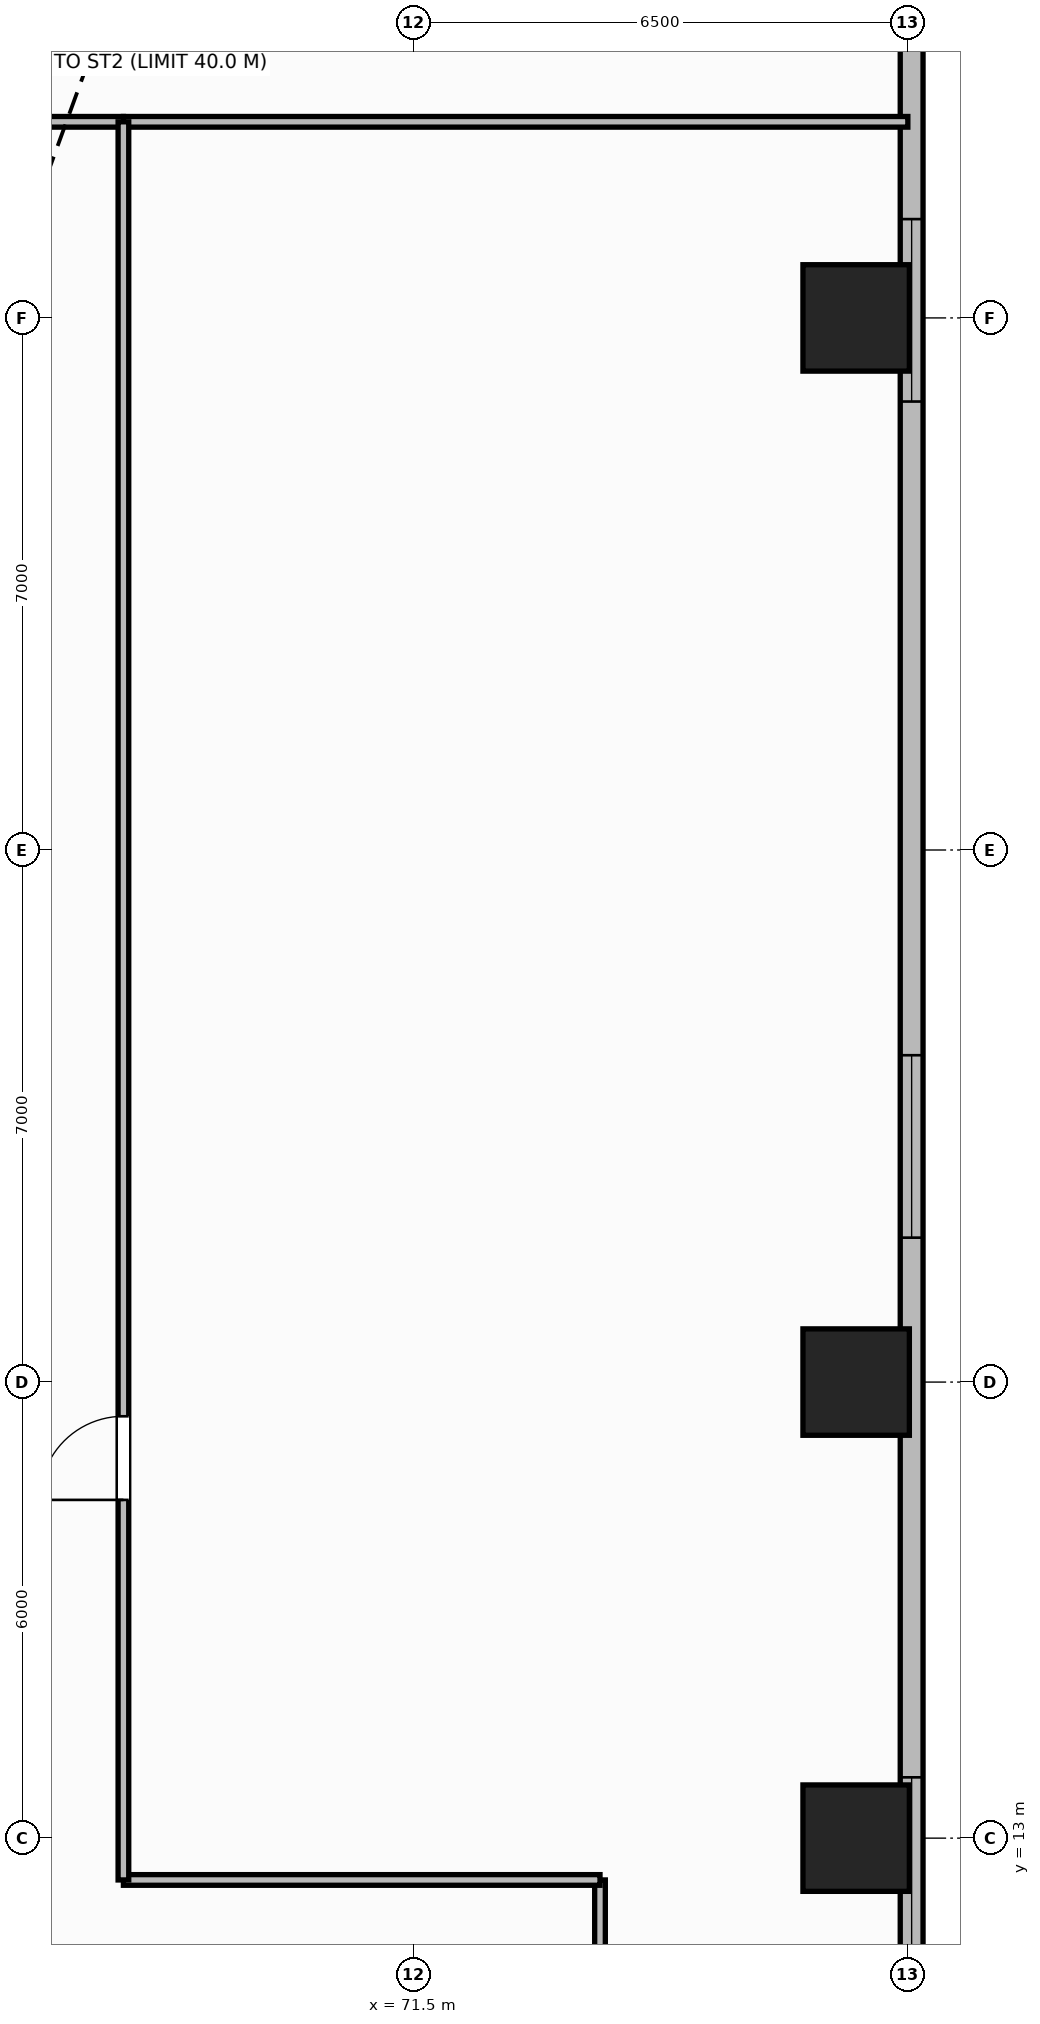
"""IFC4 building model, lengths in metres.
Left out: names, types, materials, properties, quantities, classifications, styles, units other than length and angle.
Written with IfcOpenShell. Run it as: python <this file> out.ifc"""

import sys

from ifc_helpers import new_model, si_unit, direction, frame, frame_2d, origin, origin_2d, place, context, subcontext, project, spatial, rectangle, extrude, element, fill, save


model = new_model("IFC4")
c1 = context("Model", 3, precision=1e-05, world=origin(), true_north=direction((0.0, 1.0)))
c2 = subcontext(c1, "Body", "Model", "MODEL_VIEW")
j1 = project(units=[si_unit("LENGTHUNIT", "METRE"), si_unit("PLANEANGLEUNIT", "RADIAN")], contexts=[c1])
p1 = place(None, origin())
s1 = spatial("IfcSite", under=j1, at=p1, CompositionType="ELEMENT")
p2 = place(p1, origin())
s2 = spatial("IfcBuilding", under=s1, at=p2, CompositionType="ELEMENT")
p3 = place(p2, frame((0.0, 0.0, 11.5)))
s3 = spatial("IfcBuildingStorey", under=s2, at=p3, CompositionType="ELEMENT", Elevation=11.5)
for number, where, z_axis, x_axis in (
    (1, (77.32, 13.0, 0.0), (0.0, 0.0, 1.0), (1.0, 0.0, 0.0)),
    (2, (77.32, 19.0, 0.0), (0.0, 0.0, 1.0), (1.0, 0.0, 0.0)),
    (3, (77.32, 33.0, 0.0), (0.0, 0.0, 1.0), (1.0, 0.0, 0.0)),
):
    element("IfcColumn", number, at=place(p3, frame(where, z_axis=z_axis, x_axis=x_axis)), inside=s3, PredefinedType="COLUMN", context=c2, shape_type="SweptSolid", body=[
        extrude(rectangle(XDim=1.4, YDim=1.4, at=origin_2d()), origin(), (0.0, 0.0, 1.0), 5.5),
    ])
p4 = place(p3, frame((78.05, 48.8, 0.0), z_axis=(0.0, 0.0, 1.0), x_axis=(0.0, -1.0, 0.0)))
e4 = element("IfcWall", 4, at=p4, inside=s3, PredefinedType="STANDARD", context=c2, shape_type="SweptSolid", body=[
    extrude(rectangle(XDim=45.6, YDim=0.3, at=frame_2d((22.8, 0.0))), origin(), (0.0, 0.0, 1.0), 5.22),
])
p5 = place(p4, frame((5.0, 0.0, 0.9)))
e5 = element("IfcOpeningElement", 5, at=p5, cuts=e4, PredefinedType="OPENING", context=c2, shape_type="SweptSolid", body=[
    extrude(rectangle(XDim=2.4, YDim=2.2, at=frame_2d((1.2, 1.1))), frame((0.0, 0.16, 0.0), z_axis=(0.0, -1.0, 0.0), x_axis=(1.0, 0.0, 0.0)), (0.0, 0.0, 1.0), 0.32),
])
p6 = place(p4, frame((14.5, 0.0, 0.9)))
e6 = element("IfcOpeningElement", 6, at=p6, cuts=e4, PredefinedType="OPENING", context=c2, shape_type="SweptSolid", body=[
    extrude(rectangle(XDim=2.4, YDim=2.2, at=frame_2d((1.2, 1.1))), frame((0.0, 0.16, 0.0), z_axis=(0.0, -1.0, 0.0), x_axis=(1.0, 0.0, 0.0)), (0.0, 0.0, 1.0), 0.32),
])
p7 = place(p4, frame((25.5, 0.0, 0.9)))
e7 = element("IfcOpeningElement", 7, at=p7, cuts=e4, PredefinedType="OPENING", context=c2, shape_type="SweptSolid", body=[
    extrude(rectangle(XDim=2.4, YDim=2.2, at=frame_2d((1.2, 1.1))), frame((0.0, 0.16, 0.0), z_axis=(0.0, -1.0, 0.0), x_axis=(1.0, 0.0, 0.0)), (0.0, 0.0, 1.0), 0.32),
])
p8 = place(p4, frame((35.0, 0.0, 0.9)))
e8 = element("IfcOpeningElement", 8, at=p8, cuts=e4, PredefinedType="OPENING", context=c2, shape_type="SweptSolid", body=[
    extrude(rectangle(XDim=2.4, YDim=2.2, at=frame_2d((1.2, 1.1))), frame((0.0, 0.16, 0.0), z_axis=(0.0, -1.0, 0.0), x_axis=(1.0, 0.0, 0.0)), (0.0, 0.0, 1.0), 0.32),
])
p9 = place(p3, frame((73.95, 10.19, 0.0), z_axis=(0.0, 0.0, 1.0), x_axis=(0.0, 1.0, 0.0)))
e9 = element("IfcWall", 9, at=p9, inside=s3, PredefinedType="PARTITIONING", context=c2, shape_type="SweptSolid", body=[
    extrude(rectangle(XDim=2.26, YDim=0.14, at=frame_2d((1.13, 0.0))), origin(), (0.0, 0.0, 1.0), 5.22),
])
p10 = place(p3, frame((67.68, 12.45, 0.0), z_axis=(0.0, 0.0, 1.0), x_axis=(1.0, 0.0, 0.0)))
e10 = element("IfcWall", 10, at=p10, inside=s3, PredefinedType="PARTITIONING", context=c2, shape_type="SweptSolid", body=[
    extrude(rectangle(XDim=6.27, YDim=0.14, at=frame_2d((3.135, 0.0))), origin(), (0.0, 0.0, 1.0), 5.22),
])
p11 = place(p3, frame((67.68, 35.58, 0.0), z_axis=(0.0, 0.0, 1.0), x_axis=(1.0, 0.0, 0.0)))
e11 = element("IfcWall", 11, at=p11, inside=s3, PredefinedType="PARTITIONING", context=c2, shape_type="SweptSolid", body=[
    extrude(rectangle(XDim=10.32, YDim=0.14, at=frame_2d((5.16, 0.0))), origin(), (0.0, 0.0, 1.0), 5.22),
])
p12 = place(p3, frame((52.08, 35.58, 0.0), z_axis=(0.0, 0.0, 1.0), x_axis=(1.0, 0.0, 0.0)))
e12 = element("IfcWall", 12, at=p12, inside=s3, PredefinedType="PARTITIONING", context=c2, shape_type="SweptSolid", body=[
    extrude(rectangle(XDim=15.6, YDim=0.14, at=frame_2d((7.8, 0.0))), origin(), (0.0, 0.0, 1.0), 5.22),
])
p13 = place(p12, frame((3.0, 0.0, 0.0)))
e13 = element("IfcOpeningElement", 13, at=p13, cuts=e12, PredefinedType="OPENING", context=c2, shape_type="SweptSolid", body=[
    extrude(rectangle(XDim=1.1, YDim=2.15, at=frame_2d((0.55, 1.075))), frame((0.0, 0.08, 0.0), z_axis=(0.0, -1.0, 0.0), x_axis=(1.0, 0.0, 0.0)), (0.0, 0.0, 1.0), 0.16),
])
p14 = place(p3, frame((67.68, 12.45, 0.0), z_axis=(0.0, 0.0, 1.0), x_axis=(0.0, 1.0, 0.0)))
e14 = element("IfcWall", 14, at=p14, inside=s3, PredefinedType="PARTITIONING", context=c2, shape_type="SweptSolid", body=[
    extrude(rectangle(XDim=23.13, YDim=0.14, at=frame_2d((11.565, 0.0))), origin(), (0.0, 0.0, 1.0), 5.22),
])
p15 = place(p14, frame((5.0, 0.0, 0.0)))
e15 = element("IfcOpeningElement", 15, at=p15, cuts=e14, PredefinedType="OPENING", context=c2, shape_type="SweptSolid", body=[
    extrude(rectangle(XDim=1.1, YDim=2.15, at=frame_2d((0.55, 1.075))), frame((0.0, 0.08, 0.0), z_axis=(0.0, -1.0, 0.0), x_axis=(1.0, 0.0, 0.0)), (0.0, 0.0, 1.0), 0.16),
])
p16 = place(p6, origin())
e16 = element("IfcWindow", 16, at=p16, inside=s3, PartitioningType="SINGLE_PANEL", PredefinedType="WINDOW", context=c2, shape_type="SweptSolid", body=[
    extrude(rectangle(XDim=2.4, YDim=2.2, at=frame_2d((1.2, 1.1))), frame((0.0, 0.03, 0.0), z_axis=(0.0, -1.0, 0.0), x_axis=(1.0, 0.0, 0.0)), (0.0, 0.0, 1.0), 0.06),
])
fill(e6, e16)
p17 = place(p7, origin())
e17 = element("IfcWindow", 17, at=p17, inside=s3, PartitioningType="SINGLE_PANEL", PredefinedType="WINDOW", context=c2, shape_type="SweptSolid", body=[
    extrude(rectangle(XDim=2.4, YDim=2.2, at=frame_2d((1.2, 1.1))), frame((0.0, 0.03, 0.0), z_axis=(0.0, -1.0, 0.0), x_axis=(1.0, 0.0, 0.0)), (0.0, 0.0, 1.0), 0.06),
])
fill(e7, e17)
p18 = place(p8, origin())
e18 = element("IfcWindow", 18, at=p18, inside=s3, PartitioningType="SINGLE_PANEL", PredefinedType="WINDOW", context=c2, shape_type="SweptSolid", body=[
    extrude(rectangle(XDim=2.4, YDim=2.2, at=frame_2d((1.2, 1.1))), frame((0.0, 0.03, 0.0), z_axis=(0.0, -1.0, 0.0), x_axis=(1.0, 0.0, 0.0)), (0.0, 0.0, 1.0), 0.06),
])
fill(e8, e18)
p19 = place(p15, origin())
e19 = element("IfcDoor", 19, at=p19, inside=s3, OperationType="SINGLE_SWING_LEFT", PredefinedType="DOOR", context=c2, shape_type="SweptSolid", body=[
    extrude(rectangle(XDim=1.1, YDim=2.15, at=frame_2d((0.55, 1.075))), frame((0.0, 0.025, 0.0), z_axis=(0.0, -1.0, 0.0), x_axis=(1.0, 0.0, 0.0)), (0.0, 0.0, 1.0), 0.05),
])
fill(e15, e19)
save(model, sys.argv[1])
